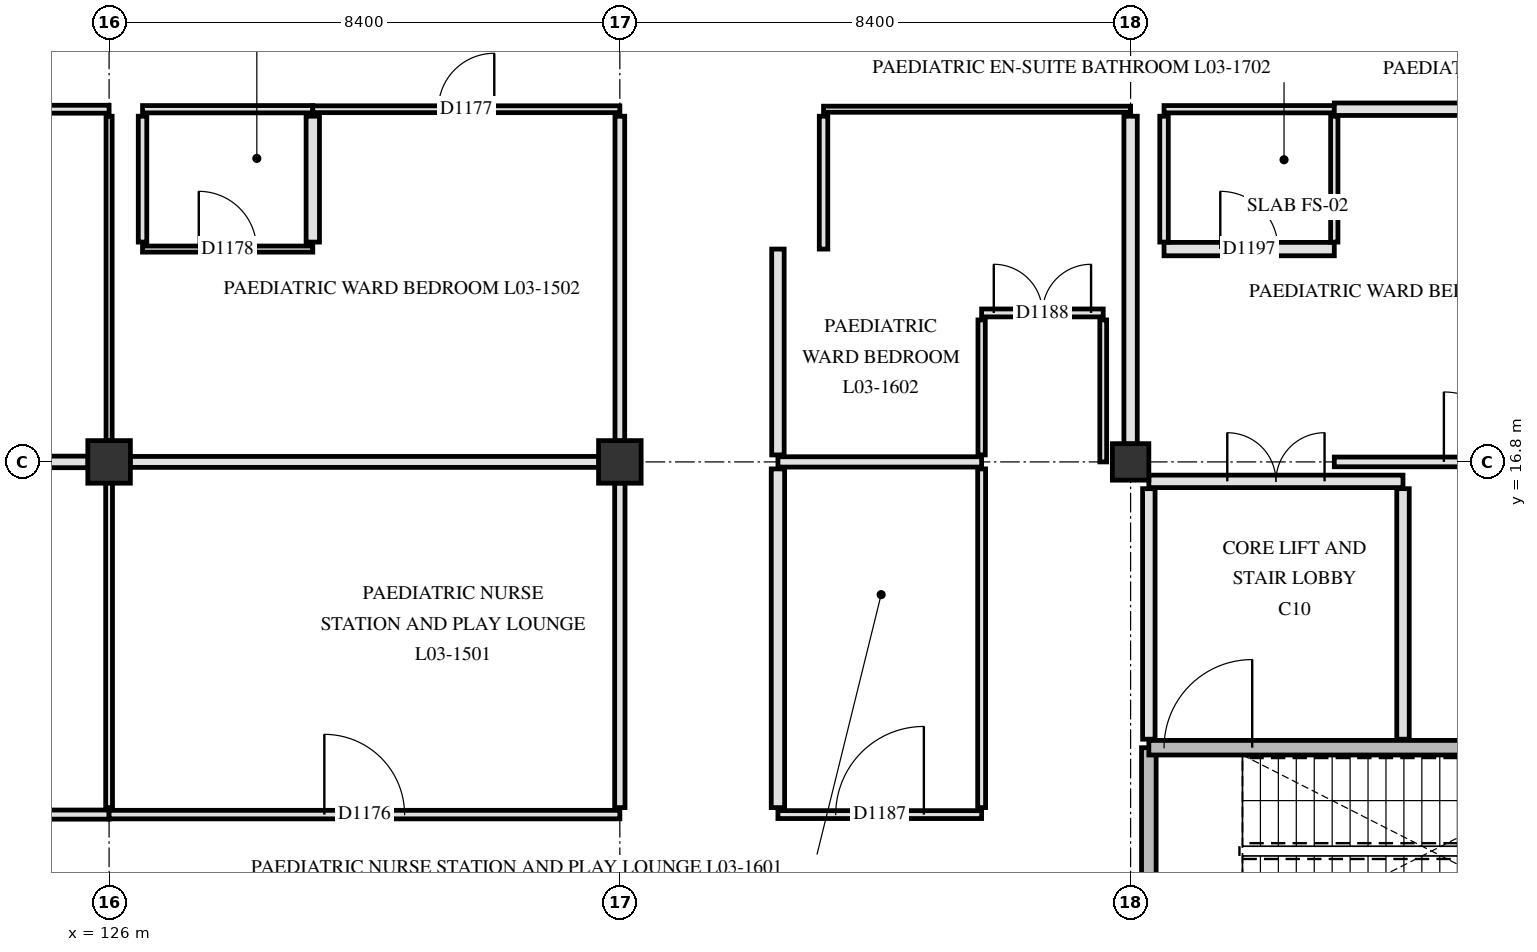
"""IFC4 building model, lengths in metres.
Left out: names, types, materials, properties, quantities, classifications, styles, units other than length and angle.
Written with IfcOpenShell. Run it as: python <this file> out.ifc"""

import sys

from ifc_helpers import new_model, si_unit, direction, frame, frame_2d, origin, origin_2d, place, context, subcontext, project, spatial, rectangle, extrude, element, fill, save


model = new_model("IFC4")
c1 = context("Model", 3, precision=1e-05, world=origin(), true_north=direction((0.0, 1.0)))
c2 = subcontext(c1, "Body", "Model", "MODEL_VIEW")
j1 = project(units=[si_unit("LENGTHUNIT", "METRE"), si_unit("PLANEANGLEUNIT", "RADIAN")], contexts=[c1])
p1 = place(None, origin())
s1 = spatial("IfcSite", under=j1, at=p1, CompositionType="ELEMENT")
p2 = place(p1, origin())
s2 = spatial("IfcBuilding", under=s1, at=p2, CompositionType="ELEMENT")
p3 = place(p2, frame((0.0, 0.0, 14.4)))
s3 = spatial("IfcBuildingStorey", under=s2, at=p3, CompositionType="ELEMENT", Elevation=14.4)
for number, where, z_axis, x_axis in (
    (1, (126.0, 16.8, 0.0), (0.0, 0.0, 1.0), (1.0, 0.0, 0.0)),
    (2, (134.4, 16.8, 0.0), (0.0, 0.0, 1.0), (1.0, 0.0, 0.0)),
):
    element("IfcColumn", number, at=place(p3, frame(where, z_axis=z_axis, x_axis=x_axis)), inside=s3, PredefinedType="COLUMN", context=c2, shape_type="SweptSolid", body=[
        extrude(rectangle(XDim=0.7, YDim=0.7, at=origin_2d()), origin(), (0.0, 0.0, 1.0), 4.2),
    ])
p4 = place(p3, frame((142.8, 16.8, 0.0), z_axis=(0.0, 0.0, 1.0), x_axis=(1.0, 0.0, 0.0)))
e3 = element("IfcColumn", 3, at=p4, inside=s3, PredefinedType="COLUMN", context=c2, shape_type="SweptSolid", body=[
    extrude(rectangle(XDim=0.6, YDim=0.6, at=origin_2d()), origin(), (0.0, 0.0, 1.0), 4.2),
])
p5 = place(p3, frame((143.1, 8.78, 0.0), z_axis=(0.0, 0.0, 1.0), x_axis=(0.0, 1.0, 0.0)))
e4 = element("IfcWall", 4, at=p5, inside=s3, PredefinedType="SHEAR", context=c2, shape_type="SweptSolid", body=[
    extrude(rectangle(XDim=3.32, YDim=0.24, at=frame_2d((1.66, 0.0))), origin(), (0.0, 0.0, 1.0), 3.9),
])
p6 = place(p3, frame((143.1, 12.1, 0.0), z_axis=(0.0, 0.0, 1.0), x_axis=(1.0, 0.0, 0.0)))
e5 = element("IfcWall", 5, at=p6, inside=s3, PredefinedType="SHEAR", context=c2, shape_type="SweptSolid", body=[
    extrude(rectangle(XDim=7.82, YDim=0.24, at=frame_2d((3.91, 0.0))), origin(), (0.0, 0.0, 1.0), 3.9),
])
p7 = place(p6, frame((0.25, 0.0, 0.0)))
e6 = element("IfcOpeningElement", 6, at=p7, cuts=e5, PredefinedType="OPENING", context=c2, shape_type="SweptSolid", body=[
    extrude(rectangle(XDim=1.45, YDim=2.2, at=frame_2d((0.725, 1.1))), frame((0.0, 0.13, 0.0), z_axis=(0.0, -1.0, 0.0), x_axis=(1.0, 0.0, 0.0)), (0.0, 0.0, 1.0), 0.26),
])
p8 = place(p3, frame((147.28, 12.24, 0.0), z_axis=(0.0, 0.0, 1.0), x_axis=(0.0, 1.0, 0.0)))
e7 = element("IfcWall", 7, at=p8, inside=s3, PredefinedType="PARTITIONING", context=c2, shape_type="SweptSolid", body=[
    extrude(rectangle(XDim=4.12, YDim=0.205, at=frame_2d((2.06, 0.0))), origin(), (0.0, 0.0, 1.0), 3.89),
])
p9 = place(p3, frame((143.1, 12.24, 0.0), z_axis=(0.0, 0.0, 1.0), x_axis=(0.0, 1.0, 0.0)))
e8 = element("IfcWall", 8, at=p9, inside=s3, PredefinedType="PARTITIONING", context=c2, shape_type="SweptSolid", body=[
    extrude(rectangle(XDim=4.12, YDim=0.205, at=frame_2d((2.06, 0.0))), origin(), (0.0, 0.0, 1.0), 3.34),
])
p10 = place(p3, frame((143.1, 16.48, 0.0), z_axis=(0.0, 0.0, 1.0), x_axis=(1.0, 0.0, 0.0)))
e9 = element("IfcWall", 9, at=p10, inside=s3, PredefinedType="PARTITIONING", context=c2, shape_type="SweptSolid", body=[
    extrude(rectangle(XDim=4.18, YDim=0.205, at=frame_2d((2.09, 0.0))), origin(), (0.0, 0.0, 1.0), 3.29),
])
p11 = place(p10, frame((1.29, 0.0, 0.0)))
e10 = element("IfcOpeningElement", 10, at=p11, cuts=e9, PredefinedType="OPENING", context=c2, shape_type="SweptSolid", body=[
    extrude(rectangle(XDim=1.6, YDim=2.25, at=frame_2d((0.8, 1.125))), frame((0.0, 0.113, 0.0), z_axis=(0.0, -1.0, 0.0), x_axis=(1.0, 0.0, 0.0)), (0.0, 0.0, 1.0), 0.225),
])
p12 = place(p3, frame((117.6, 11.0, 0.0), z_axis=(0.0, 0.0, 1.0), x_axis=(1.0, 0.0, 0.0)))
e11 = element("IfcWall", 11, at=p12, inside=s3, PredefinedType="PARTITIONING", context=c2, shape_type="SweptSolid", body=[
    extrude(rectangle(XDim=8.4, YDim=0.15, at=frame_2d((4.2, 0.0))), origin(), (0.0, 0.0, 1.0), 2.69),
])
p13 = place(p12, frame((3.675, 0.0, 0.0)))
e12 = element("IfcOpeningElement", 12, at=p13, cuts=e11, PredefinedType="OPENING", context=c2, shape_type="SweptSolid", body=[
    extrude(rectangle(XDim=1.05, YDim=2.15, at=frame_2d((0.525, 1.075))), frame((0.0, 0.085, 0.0), z_axis=(0.0, -1.0, 0.0), x_axis=(1.0, 0.0, 0.0)), (0.0, 0.0, 1.0), 0.17),
])
p14 = place(p3, frame((126.0, 11.0, 0.0), z_axis=(0.0, 0.0, 1.0), x_axis=(1.0, 0.0, 0.0)))
e13 = element("IfcWall", 13, at=p14, inside=s3, PredefinedType="PARTITIONING", context=c2, shape_type="SweptSolid", body=[
    extrude(rectangle(XDim=8.4, YDim=0.14, at=frame_2d((4.2, 0.0))), origin(), (0.0, 0.0, 1.0), 2.69),
])
p15 = place(p14, frame((3.54, 0.0, 0.0)))
e14 = element("IfcOpeningElement", 14, at=p15, cuts=e13, PredefinedType="OPENING", context=c2, shape_type="SweptSolid", body=[
    extrude(rectangle(XDim=1.32, YDim=2.18, at=frame_2d((0.66, 1.09))), frame((0.0, 0.08, 0.0), z_axis=(0.0, -1.0, 0.0), x_axis=(1.0, 0.0, 0.0)), (0.0, 0.0, 1.0), 0.16),
])
p16 = place(p3, frame((137.0, 11.0, 0.0), z_axis=(0.0, 0.0, 1.0), x_axis=(1.0, 0.0, 0.0)))
e15 = element("IfcWall", 15, at=p16, inside=s3, PredefinedType="PARTITIONING", context=c2, shape_type="SweptSolid", body=[
    extrude(rectangle(XDim=3.35, YDim=0.13, at=frame_2d((1.675, 0.0))), origin(), (0.0, 0.0, 1.0), 3.89),
])
p17 = place(p16, frame((0.95, 0.0, 0.0)))
e16 = element("IfcOpeningElement", 16, at=p17, cuts=e15, PredefinedType="OPENING", context=c2, shape_type="SweptSolid", body=[
    extrude(rectangle(XDim=1.45, YDim=2.2, at=frame_2d((0.725, 1.1))), frame((0.0, 0.075, 0.0), z_axis=(0.0, -1.0, 0.0), x_axis=(1.0, 0.0, 0.0)), (0.0, 0.0, 1.0), 0.15),
])
p18 = place(p3, frame((117.945, 16.8, 0.0), z_axis=(0.0, 0.0, 1.0), x_axis=(1.0, 0.0, 0.0)))
e17 = element("IfcWall", 17, at=p18, inside=s3, PredefinedType="PARTITIONING", context=c2, shape_type="SweptSolid", body=[
    extrude(rectangle(XDim=7.71, YDim=0.19, at=frame_2d((3.855, 0.0))), origin(), (0.0, 0.0, 1.0), 3.29),
])
p19 = place(p3, frame((126.345, 16.8, 0.0), z_axis=(0.0, 0.0, 1.0), x_axis=(1.0, 0.0, 0.0)))
e18 = element("IfcWall", 18, at=p19, inside=s3, PredefinedType="PARTITIONING", context=c2, shape_type="SweptSolid", body=[
    extrude(rectangle(XDim=7.71, YDim=0.18, at=frame_2d((3.855, 0.0))), origin(), (0.0, 0.0, 1.0), 3.29),
])
p20 = place(p3, frame((137.0, 16.8, 0.0), z_axis=(0.0, 0.0, 1.0), x_axis=(1.0, 0.0, 0.0)))
e19 = element("IfcWall", 19, at=p20, inside=s3, PredefinedType="PARTITIONING", context=c2, shape_type="SweptSolid", body=[
    extrude(rectangle(XDim=3.35, YDim=0.17, at=frame_2d((1.675, 0.0))), origin(), (0.0, 0.0, 1.0), 3.29),
])
p21 = place(p3, frame((146.15, 16.8, 0.0), z_axis=(0.0, 0.0, 1.0), x_axis=(1.0, 0.0, 0.0)))
e20 = element("IfcWall", 20, at=p21, inside=s3, PredefinedType="PARTITIONING", context=c2, shape_type="SweptSolid", body=[
    extrude(rectangle(XDim=4.755, YDim=0.16, at=frame_2d((2.377, 0.0))), origin(), (0.0, 0.0, 1.0), 3.29),
])
p22 = place(p21, frame((1.802, 0.0, 0.0)))
e21 = element("IfcOpeningElement", 21, at=p22, cuts=e20, PredefinedType="OPENING", context=c2, shape_type="SweptSolid", body=[
    extrude(rectangle(XDim=1.15, YDim=2.15, at=frame_2d((0.575, 1.075))), frame((0.0, 0.09, 0.0), z_axis=(0.0, -1.0, 0.0), x_axis=(1.0, 0.0, 0.0)), (0.0, 0.0, 1.0), 0.18),
])
p23 = place(p3, frame((140.35, 19.25, 0.0), z_axis=(0.0, 0.0, 1.0), x_axis=(1.0, 0.0, 0.0)))
e22 = element("IfcWall", 22, at=p23, inside=s3, PredefinedType="PARTITIONING", context=c2, shape_type="SweptSolid", body=[
    extrude(rectangle(XDim=2.0, YDim=0.13, at=frame_2d((1.0, 0.0))), origin(), (0.0, 0.0, 1.0), 3.89),
])
p24 = place(p23, frame((0.2, 0.0, 0.0)))
e23 = element("IfcOpeningElement", 23, at=p24, cuts=e22, PredefinedType="OPENING", context=c2, shape_type="SweptSolid", body=[
    extrude(rectangle(XDim=1.6, YDim=2.25, at=frame_2d((0.8, 1.125))), frame((0.0, 0.075, 0.0), z_axis=(0.0, -1.0, 0.0), x_axis=(1.0, 0.0, 0.0)), (0.0, 0.0, 1.0), 0.15),
])
p25 = place(p3, frame((126.55, 20.3, 0.0), z_axis=(0.0, 0.0, 1.0), x_axis=(1.0, 0.0, 0.0)))
e24 = element("IfcWall", 24, at=p25, inside=s3, PredefinedType="PARTITIONING", context=c2, shape_type="SweptSolid", body=[
    extrude(rectangle(XDim=2.8, YDim=0.1, at=frame_2d((1.4, 0.0))), origin(), (0.0, 0.0, 1.0), 3.89),
])
p26 = place(p25, frame((0.925, 0.0, 0.0)))
e25 = element("IfcOpeningElement", 25, at=p26, cuts=e24, PredefinedType="OPENING", context=c2, shape_type="SweptSolid", body=[
    extrude(rectangle(XDim=0.95, YDim=2.1, at=frame_2d((0.475, 1.05))), frame((0.0, 0.06, 0.0), z_axis=(0.0, -1.0, 0.0), x_axis=(1.0, 0.0, 0.0)), (0.0, 0.0, 1.0), 0.12),
])
p27 = place(p3, frame((143.35, 20.3, 0.0), z_axis=(0.0, 0.0, 1.0), x_axis=(1.0, 0.0, 0.0)))
e26 = element("IfcWall", 26, at=p27, inside=s3, PredefinedType="PARTITIONING", context=c2, shape_type="SweptSolid", body=[
    extrude(rectangle(XDim=2.8, YDim=0.22, at=frame_2d((1.4, 0.0))), origin(), (0.0, 0.0, 1.0), 3.89),
])
p28 = place(p27, frame((0.925, 0.0, 0.0)))
e27 = element("IfcOpeningElement", 27, at=p28, cuts=e26, PredefinedType="OPENING", context=c2, shape_type="SweptSolid", body=[
    extrude(rectangle(XDim=0.95, YDim=2.1, at=frame_2d((0.475, 1.05))), frame((0.0, 0.12, 0.0), z_axis=(0.0, -1.0, 0.0), x_axis=(1.0, 0.0, 0.0)), (0.0, 0.0, 1.0), 0.24),
])
p29 = place(p3, frame((120.95, 22.6, 0.0), z_axis=(0.0, 0.0, 1.0), x_axis=(1.0, 0.0, 0.0)))
e28 = element("IfcWall", 28, at=p29, inside=s3, PredefinedType="PARTITIONING", context=c2, shape_type="SweptSolid", body=[
    extrude(rectangle(XDim=5.05, YDim=0.13, at=frame_2d((2.525, 0.0))), origin(), (0.0, 0.0, 1.0), 2.69),
])
p30 = place(p29, frame((2.05, 0.0, 0.0)))
e29 = element("IfcOpeningElement", 29, at=p30, cuts=e28, PredefinedType="OPENING", context=c2, shape_type="SweptSolid", body=[
    extrude(rectangle(XDim=0.95, YDim=2.1, at=frame_2d((0.475, 1.05))), frame((0.0, 0.075, 0.0), z_axis=(0.0, -1.0, 0.0), x_axis=(1.0, 0.0, 0.0)), (0.0, 0.0, 1.0), 0.15),
])
p31 = place(p3, frame((126.55, 22.6, 0.0), z_axis=(0.0, 0.0, 1.0), x_axis=(1.0, 0.0, 0.0)))
e30 = element("IfcWall", 30, at=p31, inside=s3, PredefinedType="PARTITIONING", context=c2, shape_type="SweptSolid", body=[
    extrude(rectangle(XDim=2.8, YDim=0.12, at=frame_2d((1.4, 0.0))), origin(), (0.0, 0.0, 1.0), 3.89),
])
p32 = place(p3, frame((129.35, 22.6, 0.0), z_axis=(0.0, 0.0, 1.0), x_axis=(1.0, 0.0, 0.0)))
e31 = element("IfcWall", 31, at=p32, inside=s3, PredefinedType="PARTITIONING", context=c2, shape_type="SweptSolid", body=[
    extrude(rectangle(XDim=5.05, YDim=0.112, at=frame_2d((2.525, 0.0))), origin(), (0.0, 0.0, 1.0), 3.34),
])
p33 = place(p32, frame((2.065, 0.0, 0.0)))
e32 = element("IfcOpeningElement", 32, at=p33, cuts=e31, PredefinedType="OPENING", context=c2, shape_type="SweptSolid", body=[
    extrude(rectangle(XDim=0.92, YDim=2.08, at=frame_2d((0.46, 1.04))), frame((0.0, 0.066, 0.0), z_axis=(0.0, -1.0, 0.0), x_axis=(1.0, 0.0, 0.0)), (0.0, 0.0, 1.0), 0.132),
])
p34 = place(p3, frame((137.75, 22.6, 0.0), z_axis=(0.0, 0.0, 1.0), x_axis=(1.0, 0.0, 0.0)))
e33 = element("IfcWall", 33, at=p34, inside=s3, PredefinedType="PARTITIONING", context=c2, shape_type="SweptSolid", body=[
    extrude(rectangle(XDim=5.05, YDim=0.1, at=frame_2d((2.525, 0.0))), origin(), (0.0, 0.0, 1.0), 3.34),
])
p35 = place(p3, frame((143.35, 22.6, 0.0), z_axis=(0.0, 0.0, 1.0), x_axis=(1.0, 0.0, 0.0)))
e34 = element("IfcWall", 34, at=p35, inside=s3, PredefinedType="PARTITIONING", context=c2, shape_type="SweptSolid", body=[
    extrude(rectangle(XDim=2.8, YDim=0.12, at=frame_2d((1.4, 0.0))), origin(), (0.0, 0.0, 1.0), 3.89),
])
p36 = place(p3, frame((146.15, 22.6, 0.0), z_axis=(0.0, 0.0, 1.0), x_axis=(1.0, 0.0, 0.0)))
e35 = element("IfcWall", 35, at=p36, inside=s3, PredefinedType="PARTITIONING", context=c2, shape_type="SweptSolid", body=[
    extrude(rectangle(XDim=5.05, YDim=0.205, at=frame_2d((2.525, 0.0))), origin(), (0.0, 0.0, 1.0), 3.34),
])
p37 = place(p3, frame((126.0, 11.115, 0.0), z_axis=(0.0, 0.0, 1.0), x_axis=(0.0, 1.0, 0.0)))
e36 = element("IfcWall", 36, at=p37, inside=s3, PredefinedType="PARTITIONING", context=c2, shape_type="SweptSolid", body=[
    extrude(rectangle(XDim=5.34, YDim=0.112, at=frame_2d((2.67, 0.0))), origin(), (0.0, 0.0, 1.0), 2.69),
])
p38 = place(p3, frame((126.0, 17.145, 0.0), z_axis=(0.0, 0.0, 1.0), x_axis=(0.0, 1.0, 0.0)))
e37 = element("IfcWall", 37, at=p38, inside=s3, PredefinedType="PARTITIONING", context=c2, shape_type="SweptSolid", body=[
    extrude(rectangle(XDim=5.34, YDim=0.1, at=frame_2d((2.67, 0.0))), origin(), (0.0, 0.0, 1.0), 2.69),
])
p39 = place(p3, frame((126.55, 20.415, 0.0), z_axis=(0.0, 0.0, 1.0), x_axis=(0.0, 1.0, 0.0)))
e38 = element("IfcWall", 38, at=p39, inside=s3, PredefinedType="PARTITIONING", context=c2, shape_type="SweptSolid", body=[
    extrude(rectangle(XDim=2.07, YDim=0.14, at=frame_2d((1.035, 0.0))), origin(), (0.0, 0.0, 1.0), 3.89),
])
p40 = place(p3, frame((129.35, 20.415, 0.0), z_axis=(0.0, 0.0, 1.0), x_axis=(0.0, 1.0, 0.0)))
e39 = element("IfcWall", 39, at=p40, inside=s3, PredefinedType="PARTITIONING", context=c2, shape_type="SweptSolid", body=[
    extrude(rectangle(XDim=2.07, YDim=0.22, at=frame_2d((1.035, 0.0))), origin(), (0.0, 0.0, 1.0), 3.89),
])
p41 = place(p3, frame((134.4, 11.115, 0.0), z_axis=(0.0, 0.0, 1.0), x_axis=(0.0, 1.0, 0.0)))
e40 = element("IfcWall", 40, at=p41, inside=s3, PredefinedType="PARTITIONING", context=c2, shape_type="SweptSolid", body=[
    extrude(rectangle(XDim=5.34, YDim=0.17, at=frame_2d((2.67, 0.0))), origin(), (0.0, 0.0, 1.0), 3.34),
])
p42 = place(p3, frame((134.4, 17.145, 0.0), z_axis=(0.0, 0.0, 1.0), x_axis=(0.0, 1.0, 0.0)))
e41 = element("IfcWall", 41, at=p42, inside=s3, PredefinedType="PARTITIONING", context=c2, shape_type="SweptSolid", body=[
    extrude(rectangle(XDim=5.34, YDim=0.16, at=frame_2d((2.67, 0.0))), origin(), (0.0, 0.0, 1.0), 3.34),
])
p43 = place(p3, frame((137.0, 11.115, 0.0), z_axis=(0.0, 0.0, 1.0), x_axis=(0.0, 1.0, 0.0)))
e42 = element("IfcWall", 42, at=p43, inside=s3, PredefinedType="PARTITIONING", context=c2, shape_type="SweptSolid", body=[
    extrude(rectangle(XDim=5.57, YDim=0.22, at=frame_2d((2.785, 0.0))), origin(), (0.0, 0.0, 1.0), 3.29),
])
p44 = place(p3, frame((137.0, 16.915, 0.0), z_axis=(0.0, 0.0, 1.0), x_axis=(0.0, 1.0, 0.0)))
e43 = element("IfcWall", 43, at=p44, inside=s3, PredefinedType="PARTITIONING", context=c2, shape_type="SweptSolid", body=[
    extrude(rectangle(XDim=3.385, YDim=0.205, at=frame_2d((1.692, 0.0))), origin(), (0.0, 0.0, 1.0), 3.29),
])
p45 = place(p3, frame((137.75, 20.3, 0.0), z_axis=(0.0, 0.0, 1.0), x_axis=(0.0, 1.0, 0.0)))
e44 = element("IfcWall", 44, at=p45, inside=s3, PredefinedType="PARTITIONING", context=c2, shape_type="SweptSolid", body=[
    extrude(rectangle(XDim=2.185, YDim=0.14, at=frame_2d((1.093, 0.0))), origin(), (0.0, 0.0, 1.0), 3.89),
])
p46 = place(p3, frame((140.35, 11.115, 0.0), z_axis=(0.0, 0.0, 1.0), x_axis=(0.0, 1.0, 0.0)))
e45 = element("IfcWall", 45, at=p46, inside=s3, PredefinedType="PARTITIONING", context=c2, shape_type="SweptSolid", body=[
    extrude(rectangle(XDim=5.57, YDim=0.13, at=frame_2d((2.785, 0.0))), origin(), (0.0, 0.0, 1.0), 3.29),
])
p47 = place(p3, frame((140.35, 16.915, 0.0), z_axis=(0.0, 0.0, 1.0), x_axis=(0.0, 1.0, 0.0)))
e46 = element("IfcWall", 46, at=p47, inside=s3, PredefinedType="PARTITIONING", context=c2, shape_type="SweptSolid", body=[
    extrude(rectangle(XDim=2.22, YDim=0.12, at=frame_2d((1.11, 0.0))), origin(), (0.0, 0.0, 1.0), 3.29),
])
p48 = place(p3, frame((142.35, 16.8, 0.0), z_axis=(0.0, 0.0, 1.0), x_axis=(0.0, 1.0, 0.0)))
e47 = element("IfcWall", 47, at=p48, inside=s3, PredefinedType="PARTITIONING", context=c2, shape_type="SweptSolid", body=[
    extrude(rectangle(XDim=2.335, YDim=0.112, at=frame_2d((1.167, 0.0))), origin(), (0.0, 0.0, 1.0), 3.29),
])
p49 = place(p3, frame((142.8, 17.095, 0.0), z_axis=(0.0, 0.0, 1.0), x_axis=(0.0, 1.0, 0.0)))
e48 = element("IfcWall", 48, at=p49, inside=s3, PredefinedType="PARTITIONING", context=c2, shape_type="SweptSolid", body=[
    extrude(rectangle(XDim=5.39, YDim=0.22, at=frame_2d((2.695, 0.0))), origin(), (0.0, 0.0, 1.0), 3.34),
])
p50 = place(p3, frame((143.35, 20.415, 0.0), z_axis=(0.0, 0.0, 1.0), x_axis=(0.0, 1.0, 0.0)))
e49 = element("IfcWall", 49, at=p50, inside=s3, PredefinedType="PARTITIONING", context=c2, shape_type="SweptSolid", body=[
    extrude(rectangle(XDim=2.07, YDim=0.14, at=frame_2d((1.035, 0.0))), origin(), (0.0, 0.0, 1.0), 3.89),
])
p51 = place(p3, frame((146.15, 20.415, 0.0), z_axis=(0.0, 0.0, 1.0), x_axis=(0.0, 1.0, 0.0)))
e50 = element("IfcWall", 50, at=p51, inside=s3, PredefinedType="PARTITIONING", context=c2, shape_type="SweptSolid", body=[
    extrude(rectangle(XDim=2.07, YDim=0.12, at=frame_2d((1.035, 0.0))), origin(), (0.0, 0.0, 1.0), 3.89),
])
p52 = place(p7, origin())
e51 = element("IfcDoor", 51, at=p52, inside=s3, OperationType="SINGLE_SWING_RIGHT", PredefinedType="DOOR", context=c2, shape_type="SweptSolid", body=[
    extrude(rectangle(XDim=1.45, YDim=2.2, at=frame_2d((0.725, 1.1))), frame((0.0, 0.025, 0.0), z_axis=(0.0, -1.0, 0.0), x_axis=(1.0, 0.0, 0.0)), (0.0, 0.0, 1.0), 0.05),
])
fill(e6, e51)
p53 = place(p11, origin())
e52 = element("IfcDoor", 52, at=p53, inside=s3, OperationType="DOUBLE_SWING_LEFT", PredefinedType="DOOR", context=c2, shape_type="SweptSolid", body=[
    extrude(rectangle(XDim=1.6, YDim=2.25, at=frame_2d((0.8, 1.125))), frame((0.0, 0.025, 0.0), z_axis=(0.0, -1.0, 0.0), x_axis=(1.0, 0.0, 0.0)), (0.0, 0.0, 1.0), 0.05),
])
fill(e10, e52)
p54 = place(p15, origin())
e53 = element("IfcDoor", 53, at=p54, inside=s3, OperationType="SINGLE_SWING_LEFT", PredefinedType="DOOR", context=c2, shape_type="SweptSolid", body=[
    extrude(rectangle(XDim=1.32, YDim=2.18, at=frame_2d((0.66, 1.09))), frame((0.0, 0.025, 0.0), z_axis=(0.0, -1.0, 0.0), x_axis=(1.0, 0.0, 0.0)), (0.0, 0.0, 1.0), 0.05),
])
fill(e14, e53)
p55 = place(p33, origin())
e54 = element("IfcDoor", 54, at=p55, inside=s3, OperationType="SINGLE_SWING_RIGHT", PredefinedType="DOOR", context=c2, shape_type="SweptSolid", body=[
    extrude(rectangle(XDim=0.92, YDim=2.08, at=frame_2d((0.46, 1.04))), frame((0.0, 0.025, 0.0), z_axis=(0.0, -1.0, 0.0), x_axis=(1.0, 0.0, 0.0)), (0.0, 0.0, 1.0), 0.05),
])
fill(e32, e54)
p56 = place(p26, origin())
e55 = element("IfcDoor", 55, at=p56, inside=s3, OperationType="SINGLE_SWING_LEFT", PredefinedType="DOOR", context=c2, shape_type="SweptSolid", body=[
    extrude(rectangle(XDim=0.95, YDim=2.1, at=frame_2d((0.475, 1.05))), frame((0.0, 0.025, 0.0), z_axis=(0.0, -1.0, 0.0), x_axis=(1.0, 0.0, 0.0)), (0.0, 0.0, 1.0), 0.05),
])
fill(e25, e55)
p57 = place(p17, origin())
e56 = element("IfcDoor", 56, at=p57, inside=s3, OperationType="SINGLE_SWING_RIGHT", PredefinedType="DOOR", context=c2, shape_type="SweptSolid", body=[
    extrude(rectangle(XDim=1.45, YDim=2.2, at=frame_2d((0.725, 1.1))), frame((0.0, 0.025, 0.0), z_axis=(0.0, -1.0, 0.0), x_axis=(1.0, 0.0, 0.0)), (0.0, 0.0, 1.0), 0.05),
])
fill(e16, e56)
p58 = place(p24, origin())
e57 = element("IfcDoor", 57, at=p58, inside=s3, OperationType="DOUBLE_SWING_LEFT", PredefinedType="DOOR", context=c2, shape_type="SweptSolid", body=[
    extrude(rectangle(XDim=1.6, YDim=2.25, at=frame_2d((0.8, 1.125))), frame((0.0, 0.025, 0.0), z_axis=(0.0, -1.0, 0.0), x_axis=(1.0, 0.0, 0.0)), (0.0, 0.0, 1.0), 0.05),
])
fill(e23, e57)
p59 = place(p22, origin())
e58 = element("IfcDoor", 58, at=p59, inside=s3, OperationType="SINGLE_SWING_LEFT", PredefinedType="DOOR", context=c2, shape_type="SweptSolid", body=[
    extrude(rectangle(XDim=1.15, YDim=2.15, at=frame_2d((0.575, 1.075))), frame((0.0, 0.025, 0.0), z_axis=(0.0, -1.0, 0.0), x_axis=(1.0, 0.0, 0.0)), (0.0, 0.0, 1.0), 0.05),
])
fill(e21, e58)
p60 = place(p28, origin())
e59 = element("IfcDoor", 59, at=p60, inside=s3, OperationType="SINGLE_SWING_LEFT", PredefinedType="DOOR", context=c2, shape_type="SweptSolid", body=[
    extrude(rectangle(XDim=0.95, YDim=2.1, at=frame_2d((0.475, 1.05))), frame((0.0, 0.025, 0.0), z_axis=(0.0, -1.0, 0.0), x_axis=(1.0, 0.0, 0.0)), (0.0, 0.0, 1.0), 0.05),
])
fill(e27, e59)
save(model, sys.argv[1])
